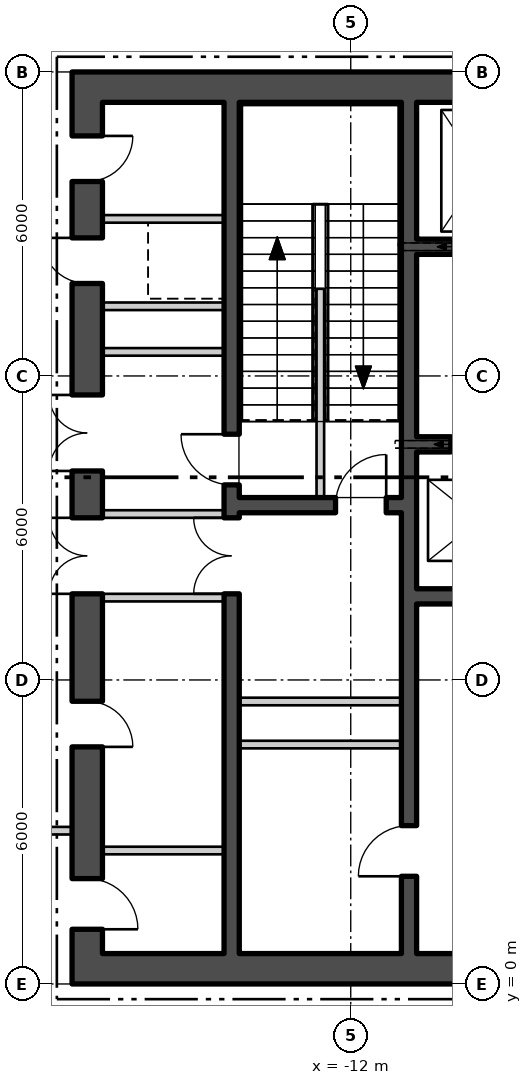
"""IFC4 building model, lengths in metres.
Left out: names, types, materials, properties, quantities, classifications, styles, units other than length and angle.
Written with IfcOpenShell. Run it as: python <this file> out.ifc"""

import sys

from ifc_helpers import new_model, si_unit, direction, frame, frame_2d, origin, place, context, subcontext, project, spatial, rectangle, extrude, element, fill, save


model = new_model("IFC4")
c1 = context("Model", 3, precision=1e-05, world=origin(), true_north=direction((0.0, 1.0)))
c2 = subcontext(c1, "Body", "Model", "MODEL_VIEW")
j1 = project(units=[si_unit("LENGTHUNIT", "METRE"), si_unit("PLANEANGLEUNIT", "RADIAN")], contexts=[c1])
p1 = place(None, origin())
s1 = spatial("IfcSite", under=j1, at=p1, CompositionType="ELEMENT")
p2 = place(p1, origin())
s2 = spatial("IfcBuilding", under=s1, at=p2, CompositionType="ELEMENT")
p3 = place(p2, origin())
s3 = spatial("IfcBuildingStorey", under=s2, at=p3, CompositionType="ELEMENT", Elevation=0.0)
p4 = place(p3, frame((-17.5, 0.3, 0.0), z_axis=(0.0, 0.0, 1.0), x_axis=(1.0, 0.0, 0.0)))
e1 = element("IfcWall", 1, at=p4, inside=s3, PredefinedType="SHEAR", context=c2, shape_type="SweptSolid", body=[
    extrude(rectangle(XDim=35.0, YDim=0.6, at=frame_2d((17.5, 0.0))), origin(), (0.0, 0.0, 1.0), 8.18),
])
p5 = place(p4, frame((12.0, 0.0, 0.0)))
e2 = element("IfcOpeningElement", 2, at=p5, cuts=e1, PredefinedType="OPENING", context=c2, shape_type="SweptSolid", body=[
    extrude(rectangle(XDim=1.8, YDim=2.4, at=frame_2d((0.9, 1.2))), frame((0.0, 0.31, 0.0), z_axis=(0.0, -1.0, 0.0), x_axis=(1.0, 0.0, 0.0)), (0.0, 0.0, 1.0), 0.62),
])
p6 = place(p4, frame((22.0, 0.0, 0.0)))
e3 = element("IfcOpeningElement", 3, at=p6, cuts=e1, PredefinedType="OPENING", context=c2, shape_type="SweptSolid", body=[
    extrude(rectangle(XDim=1.8, YDim=2.4, at=frame_2d((0.9, 1.2))), frame((0.0, 0.31, 0.0), z_axis=(0.0, -1.0, 0.0), x_axis=(1.0, 0.0, 0.0)), (0.0, 0.0, 1.0), 0.62),
])
p7 = place(p3, frame((-17.5, 17.7, 0.0), z_axis=(0.0, 0.0, 1.0), x_axis=(1.0, 0.0, 0.0)))
e4 = element("IfcWall", 4, at=p7, inside=s3, PredefinedType="SHEAR", context=c2, shape_type="SweptSolid", body=[
    extrude(rectangle(XDim=35.0, YDim=0.6, at=frame_2d((17.5, 0.0))), origin(), (0.0, 0.0, 1.0), 8.18),
])
p8 = place(p3, frame((-17.2, 0.6, 0.0), z_axis=(0.0, 0.0, 1.0), x_axis=(0.0, 1.0, 0.0)))
e5 = element("IfcWall", 5, at=p8, inside=s3, PredefinedType="SHEAR", context=c2, shape_type="SweptSolid", body=[
    extrude(rectangle(XDim=16.8, YDim=0.6, at=frame_2d((8.4, 0.0))), origin(), (0.0, 0.0, 1.0), 8.18),
])
p9 = place(p8, frame((7.1, 0.0, 0.0)))
e6 = element("IfcOpeningElement", 6, at=p9, cuts=e5, PredefinedType="OPENING", context=c2, shape_type="SweptSolid", body=[
    extrude(rectangle(XDim=1.5, YDim=2.4, at=frame_2d((0.75, 1.2))), frame((0.0, 0.31, 0.0), z_axis=(0.0, -1.0, 0.0), x_axis=(1.0, 0.0, 0.0)), (0.0, 0.0, 1.0), 0.62),
])
p10 = place(p8, frame((9.525, 0.0, 0.0)))
e7 = element("IfcOpeningElement", 7, at=p10, cuts=e5, PredefinedType="OPENING", context=c2, shape_type="SweptSolid", body=[
    extrude(rectangle(XDim=1.5, YDim=2.4, at=frame_2d((0.75, 1.2))), frame((0.0, 0.31, 0.0), z_axis=(0.0, -1.0, 0.0), x_axis=(1.0, 0.0, 0.0)), (0.0, 0.0, 1.0), 0.62),
])
p11 = place(p8, frame((0.479, 0.0, 0.0)))
e8 = element("IfcOpeningElement", 8, at=p11, cuts=e5, PredefinedType="OPENING", context=c2, shape_type="SweptSolid", body=[
    extrude(rectangle(XDim=1.0, YDim=2.1, at=frame_2d((0.5, 1.05))), frame((0.0, 0.31, 0.0), z_axis=(0.0, -1.0, 0.0), x_axis=(1.0, 0.0, 0.0)), (0.0, 0.0, 1.0), 0.62),
])
p12 = place(p8, frame((4.079, 0.0, 0.0)))
e9 = element("IfcOpeningElement", 9, at=p12, cuts=e5, PredefinedType="OPENING", context=c2, shape_type="SweptSolid", body=[
    extrude(rectangle(XDim=0.9, YDim=2.1, at=frame_2d((0.45, 1.05))), frame((0.0, 0.31, 0.0), z_axis=(0.0, -1.0, 0.0), x_axis=(1.0, 0.0, 0.0)), (0.0, 0.0, 1.0), 0.62),
])
p13 = place(p8, frame((13.225, 0.0, 0.0)))
e10 = element("IfcOpeningElement", 10, at=p13, cuts=e5, PredefinedType="OPENING", context=c2, shape_type="SweptSolid", body=[
    extrude(rectangle(XDim=0.9, YDim=2.1, at=frame_2d((0.45, 1.05))), frame((0.0, 0.31, 0.0), z_axis=(0.0, -1.0, 0.0), x_axis=(1.0, 0.0, 0.0)), (0.0, 0.0, 1.0), 0.62),
])
p14 = place(p8, frame((15.238, 0.0, 0.0)))
e11 = element("IfcOpeningElement", 11, at=p14, cuts=e5, PredefinedType="OPENING", context=c2, shape_type="SweptSolid", body=[
    extrude(rectangle(XDim=0.9, YDim=2.1, at=frame_2d((0.45, 1.05))), frame((0.0, 0.31, 0.0), z_axis=(0.0, -1.0, 0.0), x_axis=(1.0, 0.0, 0.0)), (0.0, 0.0, 1.0), 0.62),
])
p15 = place(p3, frame((-10.85, 0.6, 0.0), z_axis=(0.0, 0.0, 1.0), x_axis=(0.0, 1.0, 0.0)))
e12 = element("IfcWall", 12, at=p15, inside=s3, PredefinedType="SHEAR", context=c2, shape_type="SweptSolid", body=[
    extrude(rectangle(XDim=16.8, YDim=0.3, at=frame_2d((8.4, 0.0))), origin(), (0.0, 0.0, 1.0), 8.18),
])
p16 = place(p15, frame((1.525, 0.0, 0.0)))
e13 = element("IfcOpeningElement", 13, at=p16, cuts=e12, PredefinedType="OPENING", context=c2, shape_type="SweptSolid", body=[
    extrude(rectangle(XDim=1.0, YDim=2.1, at=frame_2d((0.5, 1.05))), frame((0.0, 0.16, 0.0), z_axis=(0.0, -1.0, 0.0), x_axis=(1.0, 0.0, 0.0)), (0.0, 0.0, 1.0), 0.32),
])
p17 = place(p3, frame((-14.35, 0.6, 0.0), z_axis=(0.0, 0.0, 1.0), x_axis=(0.0, 1.0, 0.0)))
e14 = element("IfcWall", 14, at=p17, inside=s3, PredefinedType="SHEAR", context=c2, shape_type="SweptSolid", body=[
    extrude(rectangle(XDim=16.8, YDim=0.3, at=frame_2d((8.4, 0.0))), origin(), (0.0, 0.0, 1.0), 8.18),
])
p18 = place(p17, frame((9.25, 0.0, 0.0)))
e15 = element("IfcOpeningElement", 15, at=p18, cuts=e14, PredefinedType="OPENING", context=c2, shape_type="SweptSolid", body=[
    extrude(rectangle(XDim=1.0, YDim=2.1, at=frame_2d((0.5, 1.05))), frame((0.0, 0.16, 0.0), z_axis=(0.0, -1.0, 0.0), x_axis=(1.0, 0.0, 0.0)), (0.0, 0.0, 1.0), 0.32),
])
p19 = place(p17, frame((7.1, 0.0, 0.0)))
e16 = element("IfcOpeningElement", 16, at=p19, cuts=e14, PredefinedType="OPENING", context=c2, shape_type="SweptSolid", body=[
    extrude(rectangle(XDim=1.5, YDim=2.4, at=frame_2d((0.75, 1.2))), frame((0.0, 0.16, 0.0), z_axis=(0.0, -1.0, 0.0), x_axis=(1.0, 0.0, 0.0)), (0.0, 0.0, 1.0), 0.32),
])
p20 = place(p3, frame((-14.2, 9.45, 0.0), z_axis=(0.0, 0.0, 1.0), x_axis=(1.0, 0.0, 0.0)))
e17 = element("IfcWall", 17, at=p20, inside=s3, PredefinedType="SHEAR", context=c2, shape_type="SweptSolid", body=[
    extrude(rectangle(XDim=3.2, YDim=0.3, at=frame_2d((1.6, 0.0))), origin(), (0.0, 0.0, 1.0), 8.18),
])
p21 = place(p20, frame((1.9, 0.0, 0.0)))
e18 = element("IfcOpeningElement", 18, at=p21, cuts=e17, PredefinedType="OPENING", context=c2, shape_type="SweptSolid", body=[
    extrude(rectangle(XDim=1.0, YDim=2.1, at=frame_2d((0.5, 1.05))), frame((0.0, 0.16, 0.0), z_axis=(0.0, -1.0, 0.0), x_axis=(1.0, 0.0, 0.0)), (0.0, 0.0, 1.0), 0.32),
])
p22 = place(p3, frame((-10.7, 14.55, 0.0), z_axis=(0.0, 0.0, 1.0), x_axis=(1.0, 0.0, 0.0)))
e19 = element("IfcWall", 19, at=p22, inside=s3, PredefinedType="SHEAR", context=c2, shape_type="SweptSolid", body=[
    extrude(rectangle(XDim=21.4, YDim=0.3, at=frame_2d((10.7, 0.0))), origin(), (0.0, 0.0, 1.0), 8.18),
])
p23 = place(p22, frame((0.738, 0.0, 0.0)))
e20 = element("IfcOpeningElement", 20, at=p23, cuts=e19, PredefinedType="OPENING", context=c2, shape_type="SweptSolid", body=[
    extrude(rectangle(XDim=1.1, YDim=2.1, at=frame_2d((0.55, 1.05))), frame((0.0, 0.16, 0.0), z_axis=(0.0, -1.0, 0.0), x_axis=(1.0, 0.0, 0.0)), (0.0, 0.0, 1.0), 0.32),
])
p24 = place(p22, frame((3.462, 0.0, 0.0)))
e21 = element("IfcOpeningElement", 21, at=p24, cuts=e19, PredefinedType="OPENING", context=c2, shape_type="SweptSolid", body=[
    extrude(rectangle(XDim=1.1, YDim=2.1, at=frame_2d((0.55, 1.05))), frame((0.0, 0.16, 0.0), z_axis=(0.0, -1.0, 0.0), x_axis=(1.0, 0.0, 0.0)), (0.0, 0.0, 1.0), 0.32),
])
p25 = place(p22, frame((6.138, 0.0, 0.0)))
e22 = element("IfcOpeningElement", 22, at=p25, cuts=e19, PredefinedType="OPENING", context=c2, shape_type="SweptSolid", body=[
    extrude(rectangle(XDim=1.1, YDim=2.1, at=frame_2d((0.55, 1.05))), frame((0.0, 0.16, 0.0), z_axis=(0.0, -1.0, 0.0), x_axis=(1.0, 0.0, 0.0)), (0.0, 0.0, 1.0), 0.32),
])
p26 = place(p22, frame((8.812, 0.0, 0.0)))
e23 = element("IfcOpeningElement", 23, at=p26, cuts=e19, PredefinedType="OPENING", context=c2, shape_type="SweptSolid", body=[
    extrude(rectangle(XDim=1.1, YDim=2.1, at=frame_2d((0.55, 1.05))), frame((0.0, 0.16, 0.0), z_axis=(0.0, -1.0, 0.0), x_axis=(1.0, 0.0, 0.0)), (0.0, 0.0, 1.0), 0.32),
])
p27 = place(p22, frame((11.488, 0.0, 0.0)))
e24 = element("IfcOpeningElement", 24, at=p27, cuts=e19, PredefinedType="OPENING", context=c2, shape_type="SweptSolid", body=[
    extrude(rectangle(XDim=1.1, YDim=2.1, at=frame_2d((0.55, 1.05))), frame((0.0, 0.16, 0.0), z_axis=(0.0, -1.0, 0.0), x_axis=(1.0, 0.0, 0.0)), (0.0, 0.0, 1.0), 0.32),
])
p28 = place(p22, frame((14.162, 0.0, 0.0)))
e25 = element("IfcOpeningElement", 25, at=p28, cuts=e19, PredefinedType="OPENING", context=c2, shape_type="SweptSolid", body=[
    extrude(rectangle(XDim=1.1, YDim=2.1, at=frame_2d((0.55, 1.05))), frame((0.0, 0.16, 0.0), z_axis=(0.0, -1.0, 0.0), x_axis=(1.0, 0.0, 0.0)), (0.0, 0.0, 1.0), 0.32),
])
p29 = place(p22, frame((16.837, 0.0, 0.0)))
e26 = element("IfcOpeningElement", 26, at=p29, cuts=e19, PredefinedType="OPENING", context=c2, shape_type="SweptSolid", body=[
    extrude(rectangle(XDim=1.1, YDim=2.1, at=frame_2d((0.55, 1.05))), frame((0.0, 0.16, 0.0), z_axis=(0.0, -1.0, 0.0), x_axis=(1.0, 0.0, 0.0)), (0.0, 0.0, 1.0), 0.32),
])
p30 = place(p22, frame((19.562, 0.0, 0.0)))
e27 = element("IfcOpeningElement", 27, at=p30, cuts=e19, PredefinedType="OPENING", context=c2, shape_type="SweptSolid", body=[
    extrude(rectangle(XDim=1.1, YDim=2.1, at=frame_2d((0.55, 1.05))), frame((0.0, 0.16, 0.0), z_axis=(0.0, -1.0, 0.0), x_axis=(1.0, 0.0, 0.0)), (0.0, 0.0, 1.0), 0.32),
])
p31 = place(p3, frame((-10.7, 10.65, 0.0), z_axis=(0.0, 0.0, 1.0), x_axis=(1.0, 0.0, 0.0)))
e28 = element("IfcWall", 28, at=p31, inside=s3, PredefinedType="SHEAR", context=c2, shape_type="SweptSolid", body=[
    extrude(rectangle(XDim=10.3, YDim=0.3, at=frame_2d((5.15, 0.0))), origin(), (0.0, 0.0, 1.0), 8.18),
])
p32 = place(p31, frame((0.675, 0.0, 0.0)))
e29 = element("IfcOpeningElement", 29, at=p32, cuts=e28, PredefinedType="OPENING", context=c2, shape_type="SweptSolid", body=[
    extrude(rectangle(XDim=1.1, YDim=2.1, at=frame_2d((0.55, 1.05))), frame((0.0, 0.16, 0.0), z_axis=(0.0, -1.0, 0.0), x_axis=(1.0, 0.0, 0.0)), (0.0, 0.0, 1.0), 0.32),
])
p33 = place(p31, frame((3.275, 0.0, 0.0)))
e30 = element("IfcOpeningElement", 30, at=p33, cuts=e28, PredefinedType="OPENING", context=c2, shape_type="SweptSolid", body=[
    extrude(rectangle(XDim=1.1, YDim=2.1, at=frame_2d((0.55, 1.05))), frame((0.0, 0.16, 0.0), z_axis=(0.0, -1.0, 0.0), x_axis=(1.0, 0.0, 0.0)), (0.0, 0.0, 1.0), 0.32),
])
p34 = place(p31, frame((5.825, 0.0, 0.0)))
e31 = element("IfcOpeningElement", 31, at=p34, cuts=e28, PredefinedType="OPENING", context=c2, shape_type="SweptSolid", body=[
    extrude(rectangle(XDim=1.1, YDim=2.1, at=frame_2d((0.55, 1.05))), frame((0.0, 0.16, 0.0), z_axis=(0.0, -1.0, 0.0), x_axis=(1.0, 0.0, 0.0)), (0.0, 0.0, 1.0), 0.32),
])
p35 = place(p31, frame((8.375, 0.0, 0.0)))
e32 = element("IfcOpeningElement", 32, at=p35, cuts=e28, PredefinedType="OPENING", context=c2, shape_type="SweptSolid", body=[
    extrude(rectangle(XDim=1.1, YDim=2.1, at=frame_2d((0.55, 1.05))), frame((0.0, 0.16, 0.0), z_axis=(0.0, -1.0, 0.0), x_axis=(1.0, 0.0, 0.0)), (0.0, 0.0, 1.0), 0.32),
])
p36 = place(p3, frame((-10.7, 7.65, 0.0), z_axis=(0.0, 0.0, 1.0), x_axis=(1.0, 0.0, 0.0)))
e33 = element("IfcWall", 33, at=p36, inside=s3, PredefinedType="SHEAR", context=c2, shape_type="SweptSolid", body=[
    extrude(rectangle(XDim=10.3, YDim=0.3, at=frame_2d((5.15, 0.0))), origin(), (0.0, 0.0, 1.0), 8.18),
])
p37 = place(p3, frame((-12.6, 9.6, 0.0), z_axis=(0.0, 0.0, 1.0), x_axis=(0.0, 1.0, 0.0)))
e34 = element("IfcWall", 34, at=p37, inside=s3, PredefinedType="PARTITIONING", context=c2, shape_type="SweptSolid", body=[
    extrude(rectangle(XDim=1.26, YDim=0.15, at=frame_2d((0.63, 0.0))), origin(), (0.0, 0.0, 1.0), 4.0),
])
p38 = place(p3, frame((-12.6, 10.86, 0.0), z_axis=(0.0, 0.0, 1.0), x_axis=(0.0, 1.0, 0.0)))
e35 = element("IfcWall", 35, at=p38, inside=s3, PredefinedType="PARTITIONING", context=c2, shape_type="SweptSolid", body=[
    extrude(rectangle(XDim=0.24, YDim=0.15, at=frame_2d((0.12, 0.0))), origin(), (0.0, 0.0, 1.0), 3.77),
])
p39 = place(p3, frame((-12.6, 11.1, 0.0), z_axis=(0.0, 0.0, 1.0), x_axis=(0.0, 1.0, 0.0)))
e36 = element("IfcWall", 36, at=p39, inside=s3, PredefinedType="PARTITIONING", context=c2, shape_type="SweptSolid", body=[
    extrude(rectangle(XDim=2.62, YDim=0.15, at=frame_2d((1.31, 0.0))), origin(), (0.0, 0.0, 1.0), 4.0),
])
for number, where, z_axis, x_axis in (
    (37, (-14.2, 5.575, 0.0), (0.0, 0.0, 1.0), (1.0, 0.0, 0.0)),
    (38, (-14.2, 4.725, 0.0), (0.0, 0.0, 1.0), (1.0, 0.0, 0.0)),
):
    element("IfcWall", number, at=place(p3, frame(where, z_axis=z_axis, x_axis=x_axis)), inside=s3, PredefinedType="PARTITIONING", context=c2, shape_type="SweptSolid", body=[
        extrude(rectangle(XDim=3.2, YDim=0.15, at=frame_2d((1.6, 0.0))), origin(), (0.0, 0.0, 1.0), 8.18),
    ])
for number, where, z_axis, x_axis in (
    (39, (-16.9, 7.625, 0.0), (0.0, 0.0, 1.0), (1.0, 0.0, 0.0)),
    (40, (-16.9, 9.275, 0.0), (0.0, 0.0, 1.0), (1.0, 0.0, 0.0)),
    (41, (-16.9, 12.475, 0.0), (0.0, 0.0, 1.0), (1.0, 0.0, 0.0)),
    (42, (-16.9, 13.375, 0.0), (0.0, 0.0, 1.0), (1.0, 0.0, 0.0)),
    (43, (-16.9, 2.634, 0.0), (0.0, 0.0, 1.0), (1.0, 0.0, 0.0)),
    (44, (-16.9, 15.1, 0.0), (0.0, 0.0, 1.0), (1.0, 0.0, 0.0)),
):
    element("IfcWall", number, at=place(p3, frame(where, z_axis=z_axis, x_axis=x_axis)), inside=s3, PredefinedType="PARTITIONING", context=c2, shape_type="SweptSolid", body=[
        extrude(rectangle(XDim=2.4, YDim=0.15, at=frame_2d((1.2, 0.0))), origin(), (0.0, 0.0, 1.0), 8.18),
    ])
p40 = place(p3, frame((-19.825, 3.025, 0.0), z_axis=(0.0, 0.0, 1.0), x_axis=(1.0, 0.0, 0.0)))
e45 = element("IfcWall", 45, at=p40, inside=s3, PredefinedType="PARTITIONING", context=c2, shape_type="SweptSolid", body=[
    extrude(rectangle(XDim=2.325, YDim=0.15, at=frame_2d((1.163, 0.0))), origin(), (0.0, 0.0, 1.0), 7.63),
])
p41 = place(p40, frame((0.662, 0.0, 0.0)))
e46 = element("IfcOpeningElement", 46, at=p41, cuts=e45, PredefinedType="OPENING", context=c2, shape_type="SweptSolid", body=[
    extrude(rectangle(XDim=1.0, YDim=2.1, at=frame_2d((0.5, 1.05))), frame((0.0, 0.085, 0.0), z_axis=(0.0, -1.0, 0.0), x_axis=(1.0, 0.0, 0.0)), (0.0, 0.0, 1.0), 0.17),
])
p42 = place(p32, origin())
e47 = element("IfcDoor", 47, at=p42, inside=s3, OperationType="SLIDING_TO_LEFT", PredefinedType="DOOR", context=c2, shape_type="SweptSolid", body=[
    extrude(rectangle(XDim=1.1, YDim=2.1, at=frame_2d((0.55, 1.05))), frame((0.0, 0.025, 0.0), z_axis=(0.0, -1.0, 0.0), x_axis=(1.0, 0.0, 0.0)), (0.0, 0.0, 1.0), 0.05),
])
fill(e29, e47)
p43 = place(p21, origin())
e48 = element("IfcDoor", 48, at=p43, inside=s3, OperationType="SINGLE_SWING_LEFT", PredefinedType="DOOR", context=c2, shape_type="SweptSolid", body=[
    extrude(rectangle(XDim=1.0, YDim=2.1, at=frame_2d((0.5, 1.05))), frame((0.0, 0.025, 0.0), z_axis=(0.0, -1.0, 0.0), x_axis=(1.0, 0.0, 0.0)), (0.0, 0.0, 1.0), 0.05),
])
fill(e18, e48)
p44 = place(p18, origin())
e49 = element("IfcDoor", 49, at=p44, inside=s3, OperationType="SINGLE_SWING_LEFT", PredefinedType="DOOR", context=c2, shape_type="SweptSolid", body=[
    extrude(rectangle(XDim=1.0, YDim=2.1, at=frame_2d((0.5, 1.05))), frame((0.0, 0.025, 0.0), z_axis=(0.0, -1.0, 0.0), x_axis=(1.0, 0.0, 0.0)), (0.0, 0.0, 1.0), 0.05),
])
fill(e15, e49)
p45 = place(p16, origin())
e50 = element("IfcDoor", 50, at=p45, inside=s3, OperationType="SINGLE_SWING_RIGHT", PredefinedType="DOOR", context=c2, shape_type="SweptSolid", body=[
    extrude(rectangle(XDim=1.0, YDim=2.1, at=frame_2d((0.5, 1.05))), frame((0.0, 0.025, 0.0), z_axis=(0.0, -1.0, 0.0), x_axis=(1.0, 0.0, 0.0)), (0.0, 0.0, 1.0), 0.05),
])
fill(e13, e50)
p46 = place(p19, origin())
e51 = element("IfcDoor", 51, at=p46, inside=s3, OperationType="DOUBLE_DOOR_SINGLE_SWING", PredefinedType="DOOR", context=c2, shape_type="SweptSolid", body=[
    extrude(rectangle(XDim=1.5, YDim=2.4, at=frame_2d((0.75, 1.2))), frame((0.0, 0.025, 0.0), z_axis=(0.0, -1.0, 0.0), x_axis=(1.0, 0.0, 0.0)), (0.0, 0.0, 1.0), 0.05),
])
fill(e16, e51)
p47 = place(p9, origin())
e52 = element("IfcDoor", 52, at=p47, inside=s3, OperationType="DOUBLE_DOOR_SINGLE_SWING", PredefinedType="DOOR", context=c2, shape_type="SweptSolid", body=[
    extrude(rectangle(XDim=1.5, YDim=2.4, at=frame_2d((0.75, 1.2))), frame((0.0, 0.025, 0.0), z_axis=(0.0, -1.0, 0.0), x_axis=(1.0, 0.0, 0.0)), (0.0, 0.0, 1.0), 0.05),
])
fill(e6, e52)
p48 = place(p10, origin())
e53 = element("IfcDoor", 53, at=p48, inside=s3, OperationType="DOUBLE_DOOR_SINGLE_SWING", PredefinedType="DOOR", context=c2, shape_type="SweptSolid", body=[
    extrude(rectangle(XDim=1.5, YDim=2.4, at=frame_2d((0.75, 1.2))), frame((0.0, 0.025, 0.0), z_axis=(0.0, -1.0, 0.0), x_axis=(1.0, 0.0, 0.0)), (0.0, 0.0, 1.0), 0.05),
])
fill(e7, e53)
p49 = place(p11, origin())
e54 = element("IfcDoor", 54, at=p49, inside=s3, OperationType="SINGLE_SWING_LEFT", PredefinedType="DOOR", context=c2, shape_type="SweptSolid", body=[
    extrude(rectangle(XDim=1.0, YDim=2.1, at=frame_2d((0.5, 1.05))), frame((0.0, 0.025, 0.0), z_axis=(0.0, -1.0, 0.0), x_axis=(1.0, 0.0, 0.0)), (0.0, 0.0, 1.0), 0.05),
])
fill(e8, e54)
p50 = place(p12, origin())
e55 = element("IfcDoor", 55, at=p50, inside=s3, OperationType="SINGLE_SWING_LEFT", PredefinedType="DOOR", context=c2, shape_type="SweptSolid", body=[
    extrude(rectangle(XDim=0.9, YDim=2.1, at=frame_2d((0.45, 1.05))), frame((0.0, 0.025, 0.0), z_axis=(0.0, -1.0, 0.0), x_axis=(1.0, 0.0, 0.0)), (0.0, 0.0, 1.0), 0.05),
])
fill(e9, e55)
p51 = place(p13, origin())
e56 = element("IfcDoor", 56, at=p51, inside=s3, OperationType="SINGLE_SWING_LEFT", PredefinedType="DOOR", context=c2, shape_type="SweptSolid", body=[
    extrude(rectangle(XDim=0.9, YDim=2.1, at=frame_2d((0.45, 1.05))), frame((0.0, 0.025, 0.0), z_axis=(0.0, -1.0, 0.0), x_axis=(1.0, 0.0, 0.0)), (0.0, 0.0, 1.0), 0.05),
])
fill(e10, e56)
p52 = place(p14, origin())
e57 = element("IfcDoor", 57, at=p52, inside=s3, OperationType="SINGLE_SWING_RIGHT", PredefinedType="DOOR", context=c2, shape_type="SweptSolid", body=[
    extrude(rectangle(XDim=0.9, YDim=2.1, at=frame_2d((0.45, 1.05))), frame((0.0, 0.025, 0.0), z_axis=(0.0, -1.0, 0.0), x_axis=(1.0, 0.0, 0.0)), (0.0, 0.0, 1.0), 0.05),
])
fill(e11, e57)
save(model, sys.argv[1])
